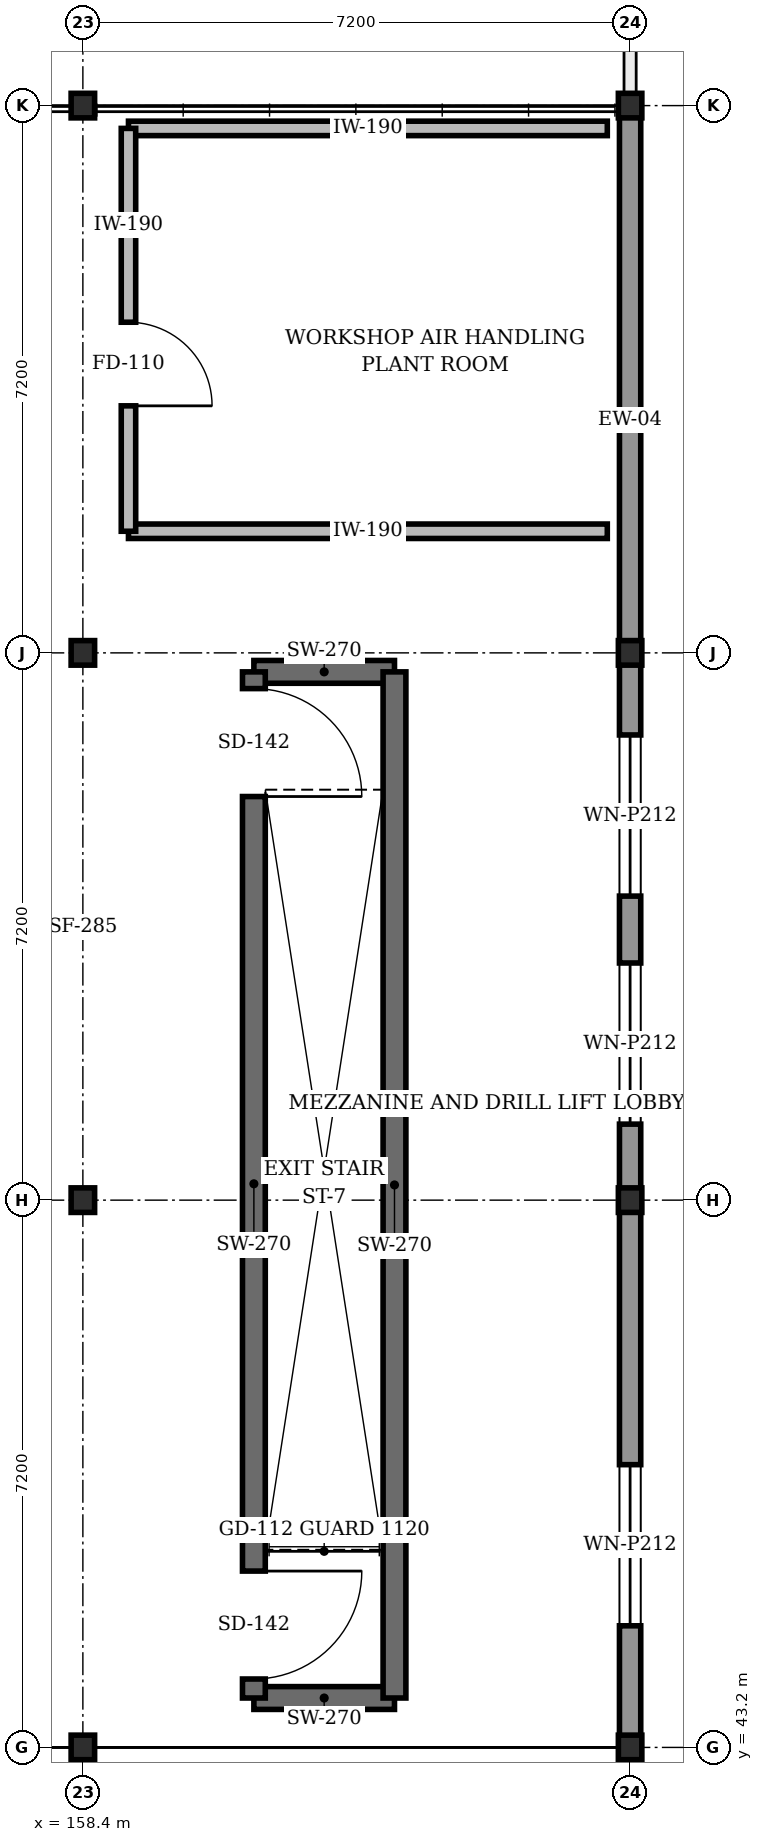
"""IFC4 building model, lengths in metres.
Left out: names, types, materials, properties, quantities, classifications, styles, units other than length and angle.
Written with IfcOpenShell. Run it as: python <this file> out.ifc"""

import sys

from ifc_helpers import new_model, si_unit, direction, frame, frame_2d, origin, origin_2d, place, context, subcontext, project, spatial, rectangle, i_section, extrude, element, fill, save


model = new_model("IFC4")
c1 = context("Model", 3, precision=1e-05, world=origin(), true_north=direction((0.0, 1.0)))
c2 = subcontext(c1, "Body", "Model", "MODEL_VIEW")
j1 = project(units=[si_unit("LENGTHUNIT", "METRE"), si_unit("PLANEANGLEUNIT", "RADIAN")], contexts=[c1])
p1 = place(None, origin())
s1 = spatial("IfcSite", under=j1, at=p1, CompositionType="ELEMENT")
p2 = place(p1, origin())
s2 = spatial("IfcBuilding", under=s1, at=p2, CompositionType="ELEMENT")
p3 = place(p2, frame((0.0, 0.0, 6.0)))
s3 = spatial("IfcBuildingStorey", under=s2, at=p3, CompositionType="ELEMENT", Elevation=6.0)
for number, where, z_axis, x_axis in (
    (1, (158.4, 43.2, 0.0), (0.0, 0.0, 1.0), (1.0, 0.0, 0.0)),
    (2, (158.4, 50.4, 0.0), (0.0, 0.0, 1.0), (1.0, 0.0, 0.0)),
    (3, (158.4, 57.6, 0.0), (0.0, 0.0, 1.0), (1.0, 0.0, 0.0)),
    (4, (158.4, 64.8, 0.0), (0.0, 0.0, 1.0), (1.0, 0.0, 0.0)),
    (5, (165.6, 43.2, 0.0), (0.0, 0.0, 1.0), (1.0, 0.0, 0.0)),
    (6, (165.6, 50.4, 0.0), (0.0, 0.0, 1.0), (1.0, 0.0, 0.0)),
    (7, (165.6, 57.6, 0.0), (0.0, 0.0, 1.0), (1.0, 0.0, 0.0)),
    (8, (165.6, 64.8, 0.0), (0.0, 0.0, 1.0), (1.0, 0.0, 0.0)),
):
    element("IfcColumn", number, at=place(p3, frame(where, z_axis=z_axis, x_axis=x_axis)), inside=s3, PredefinedType="COLUMN", context=c2, shape_type="SweptSolid", body=[
        extrude(i_section(OverallWidth=0.309, OverallDepth=0.323, WebThickness=0.014, FlangeThickness=0.023, at=origin_2d()), origin(), (0.0, 0.0, 1.0), 4.2),
    ])
p4 = place(p3, frame((165.6, 43.2, 0.0), z_axis=(0.0, 0.0, 1.0), x_axis=(0.0, 1.0, 0.0)))
e9 = element("IfcWall", 9, at=p4, inside=s3, PredefinedType="STANDARD", context=c2, shape_type="SweptSolid", body=[
    extrude(rectangle(XDim=21.6, YDim=0.28, at=frame_2d((10.8, 0.0))), origin(), (0.0, 0.0, 1.0), 3.327),
])
p5 = place(p4, frame((1.6, 0.0, 1.15)))
e10 = element("IfcOpeningElement", 10, at=p5, cuts=e9, PredefinedType="OPENING", context=c2, shape_type="SweptSolid", body=[
    extrude(rectangle(XDim=2.12, YDim=1.76, at=frame_2d((1.06, 0.88))), frame((0.0, 0.15, 0.0), z_axis=(0.0, -1.0, 0.0), x_axis=(1.0, 0.0, 0.0)), (0.0, 0.0, 1.0), 0.3),
])
p6 = place(p4, frame((8.2, 0.0, 1.15)))
e11 = element("IfcOpeningElement", 11, at=p6, cuts=e9, PredefinedType="OPENING", context=c2, shape_type="SweptSolid", body=[
    extrude(rectangle(XDim=2.12, YDim=1.76, at=frame_2d((1.06, 0.88))), frame((0.0, 0.15, 0.0), z_axis=(0.0, -1.0, 0.0), x_axis=(1.0, 0.0, 0.0)), (0.0, 0.0, 1.0), 0.3),
])
p7 = place(p4, frame((11.2, 0.0, 1.15)))
e12 = element("IfcOpeningElement", 12, at=p7, cuts=e9, PredefinedType="OPENING", context=c2, shape_type="SweptSolid", body=[
    extrude(rectangle(XDim=2.12, YDim=1.76, at=frame_2d((1.06, 0.88))), frame((0.0, 0.15, 0.0), z_axis=(0.0, -1.0, 0.0), x_axis=(1.0, 0.0, 0.0)), (0.0, 0.0, 1.0), 0.3),
])
for number, where, z_axis, x_axis in (
    (13, (160.65, 43.85, 0.0), (0.0, 0.0, 1.0), (1.0, 0.0, 0.0)),
    (14, (162.5, 57.35, 0.0), (0.0, 0.0, 1.0), (-1.0, 0.0, 0.0)),
):
    element("IfcWall", number, at=place(p3, frame(where, z_axis=z_axis, x_axis=x_axis)), inside=s3, PredefinedType="SHEAR", context=c2, shape_type="SweptSolid", body=[
        extrude(rectangle(XDim=1.85, YDim=0.3, at=frame_2d((0.925, 0.0))), origin(), (0.0, 0.0, 1.0), 3.94),
    ])
p8 = place(p3, frame((160.65, 57.35, 0.0), z_axis=(0.0, 0.0, 1.0), x_axis=(0.0, -1.0, 0.0)))
e15 = element("IfcWall", 15, at=p8, inside=s3, PredefinedType="SHEAR", context=c2, shape_type="SweptSolid", body=[
    extrude(rectangle(XDim=13.5, YDim=0.3, at=frame_2d((6.75, 0.0))), origin(), (0.0, 0.0, 1.0), 3.94),
])
p9 = place(p8, frame((11.83, 0.0, 0.0)))
e16 = element("IfcOpeningElement", 16, at=p9, cuts=e15, PredefinedType="OPENING", context=c2, shape_type="SweptSolid", body=[
    extrude(rectangle(XDim=1.42, YDim=2.22, at=frame_2d((0.71, 1.11))), frame((0.0, 0.16, 0.0), z_axis=(0.0, -1.0, 0.0), x_axis=(1.0, 0.0, 0.0)), (0.0, 0.0, 1.0), 0.32),
])
p10 = place(p8, frame((0.22, 0.0, 0.0)))
e17 = element("IfcOpeningElement", 17, at=p10, cuts=e15, PredefinedType="OPENING", context=c2, shape_type="SweptSolid", body=[
    extrude(rectangle(XDim=1.42, YDim=2.22, at=frame_2d((0.71, 1.11))), frame((0.0, 0.16, 0.0), z_axis=(0.0, -1.0, 0.0), x_axis=(1.0, 0.0, 0.0)), (0.0, 0.0, 1.0), 0.32),
])
p11 = place(p3, frame((162.5, 43.85, 0.0), z_axis=(0.0, 0.0, 1.0), x_axis=(0.0, 1.0, 0.0)))
e18 = element("IfcWall", 18, at=p11, inside=s3, PredefinedType="SHEAR", context=c2, shape_type="SweptSolid", body=[
    extrude(rectangle(XDim=13.5, YDim=0.3, at=frame_2d((6.75, 0.0))), origin(), (0.0, 0.0, 1.0), 3.94),
])
for number, where, z_axis, x_axis in (
    (19, (159.0, 59.2, 0.0), (0.0, 0.0, 1.0), (1.0, 0.0, 0.0)),
    (20, (165.3, 64.5, 0.0), (0.0, 0.0, 1.0), (-1.0, 0.0, 0.0)),
):
    element("IfcWall", number, at=place(p3, frame(where, z_axis=z_axis, x_axis=x_axis)), inside=s3, PredefinedType="STANDARD", context=c2, shape_type="SweptSolid", body=[
        extrude(rectangle(XDim=6.3, YDim=0.19, at=frame_2d((3.15, 0.0))), origin(), (0.0, 0.0, 1.0), 3.563),
    ])
p12 = place(p3, frame((159.0, 64.5, 0.0), z_axis=(0.0, 0.0, 1.0), x_axis=(0.0, -1.0, 0.0)))
e21 = element("IfcWall", 21, at=p12, inside=s3, PredefinedType="STANDARD", context=c2, shape_type="SweptSolid", body=[
    extrude(rectangle(XDim=5.3, YDim=0.19, at=frame_2d((2.65, 0.0))), origin(), (0.0, 0.0, 1.0), 3.94),
])
p13 = place(p12, frame((2.55, 0.0, 0.0)))
e22 = element("IfcOpeningElement", 22, at=p13, cuts=e21, PredefinedType="OPENING", context=c2, shape_type="SweptSolid", body=[
    extrude(rectangle(XDim=1.1, YDim=2.16, at=frame_2d((0.55, 1.08))), frame((0.0, 0.105, 0.0), z_axis=(0.0, -1.0, 0.0), x_axis=(1.0, 0.0, 0.0)), (0.0, 0.0, 1.0), 0.21),
])
p14 = place(p5, origin())
e23 = element("IfcWindow", 23, at=p14, inside=s3, PartitioningType="SINGLE_PANEL", PredefinedType="WINDOW", context=c2, shape_type="SweptSolid", body=[
    extrude(rectangle(XDim=2.12, YDim=1.76, at=frame_2d((1.06, 0.88))), frame((0.0, 0.03, 0.0), z_axis=(0.0, -1.0, 0.0), x_axis=(1.0, 0.0, 0.0)), (0.0, 0.0, 1.0), 0.06),
])
fill(e10, e23)
p15 = place(p6, origin())
e24 = element("IfcWindow", 24, at=p15, inside=s3, PartitioningType="SINGLE_PANEL", PredefinedType="WINDOW", context=c2, shape_type="SweptSolid", body=[
    extrude(rectangle(XDim=2.12, YDim=1.76, at=frame_2d((1.06, 0.88))), frame((0.0, 0.03, 0.0), z_axis=(0.0, -1.0, 0.0), x_axis=(1.0, 0.0, 0.0)), (0.0, 0.0, 1.0), 0.06),
])
fill(e11, e24)
p16 = place(p7, origin())
e25 = element("IfcWindow", 25, at=p16, inside=s3, PartitioningType="SINGLE_PANEL", PredefinedType="WINDOW", context=c2, shape_type="SweptSolid", body=[
    extrude(rectangle(XDim=2.12, YDim=1.76, at=frame_2d((1.06, 0.88))), frame((0.0, 0.03, 0.0), z_axis=(0.0, -1.0, 0.0), x_axis=(1.0, 0.0, 0.0)), (0.0, 0.0, 1.0), 0.06),
])
fill(e12, e25)
p17 = place(p9, origin())
e26 = element("IfcDoor", 26, at=p17, inside=s3, OperationType="SINGLE_SWING_LEFT", PredefinedType="DOOR", context=c2, shape_type="SweptSolid", body=[
    extrude(rectangle(XDim=1.42, YDim=2.22, at=frame_2d((0.71, 1.11))), frame((0.0, 0.025, 0.0), z_axis=(0.0, -1.0, 0.0), x_axis=(1.0, 0.0, 0.0)), (0.0, 0.0, 1.0), 0.05),
])
fill(e16, e26)
p18 = place(p10, origin())
e27 = element("IfcDoor", 27, at=p18, inside=s3, OperationType="SINGLE_SWING_RIGHT", PredefinedType="DOOR", context=c2, shape_type="SweptSolid", body=[
    extrude(rectangle(XDim=1.42, YDim=2.22, at=frame_2d((0.71, 1.11))), frame((0.0, 0.025, 0.0), z_axis=(0.0, -1.0, 0.0), x_axis=(1.0, 0.0, 0.0)), (0.0, 0.0, 1.0), 0.05),
])
fill(e17, e27)
p19 = place(p13, origin())
e28 = element("IfcDoor", 28, at=p19, inside=s3, OperationType="SINGLE_SWING_RIGHT", PredefinedType="DOOR", context=c2, shape_type="SweptSolid", body=[
    extrude(rectangle(XDim=1.1, YDim=2.16, at=frame_2d((0.55, 1.08))), frame((0.0, 0.025, 0.0), z_axis=(0.0, -1.0, 0.0), x_axis=(1.0, 0.0, 0.0)), (0.0, 0.0, 1.0), 0.05),
])
fill(e22, e28)
save(model, sys.argv[1])
